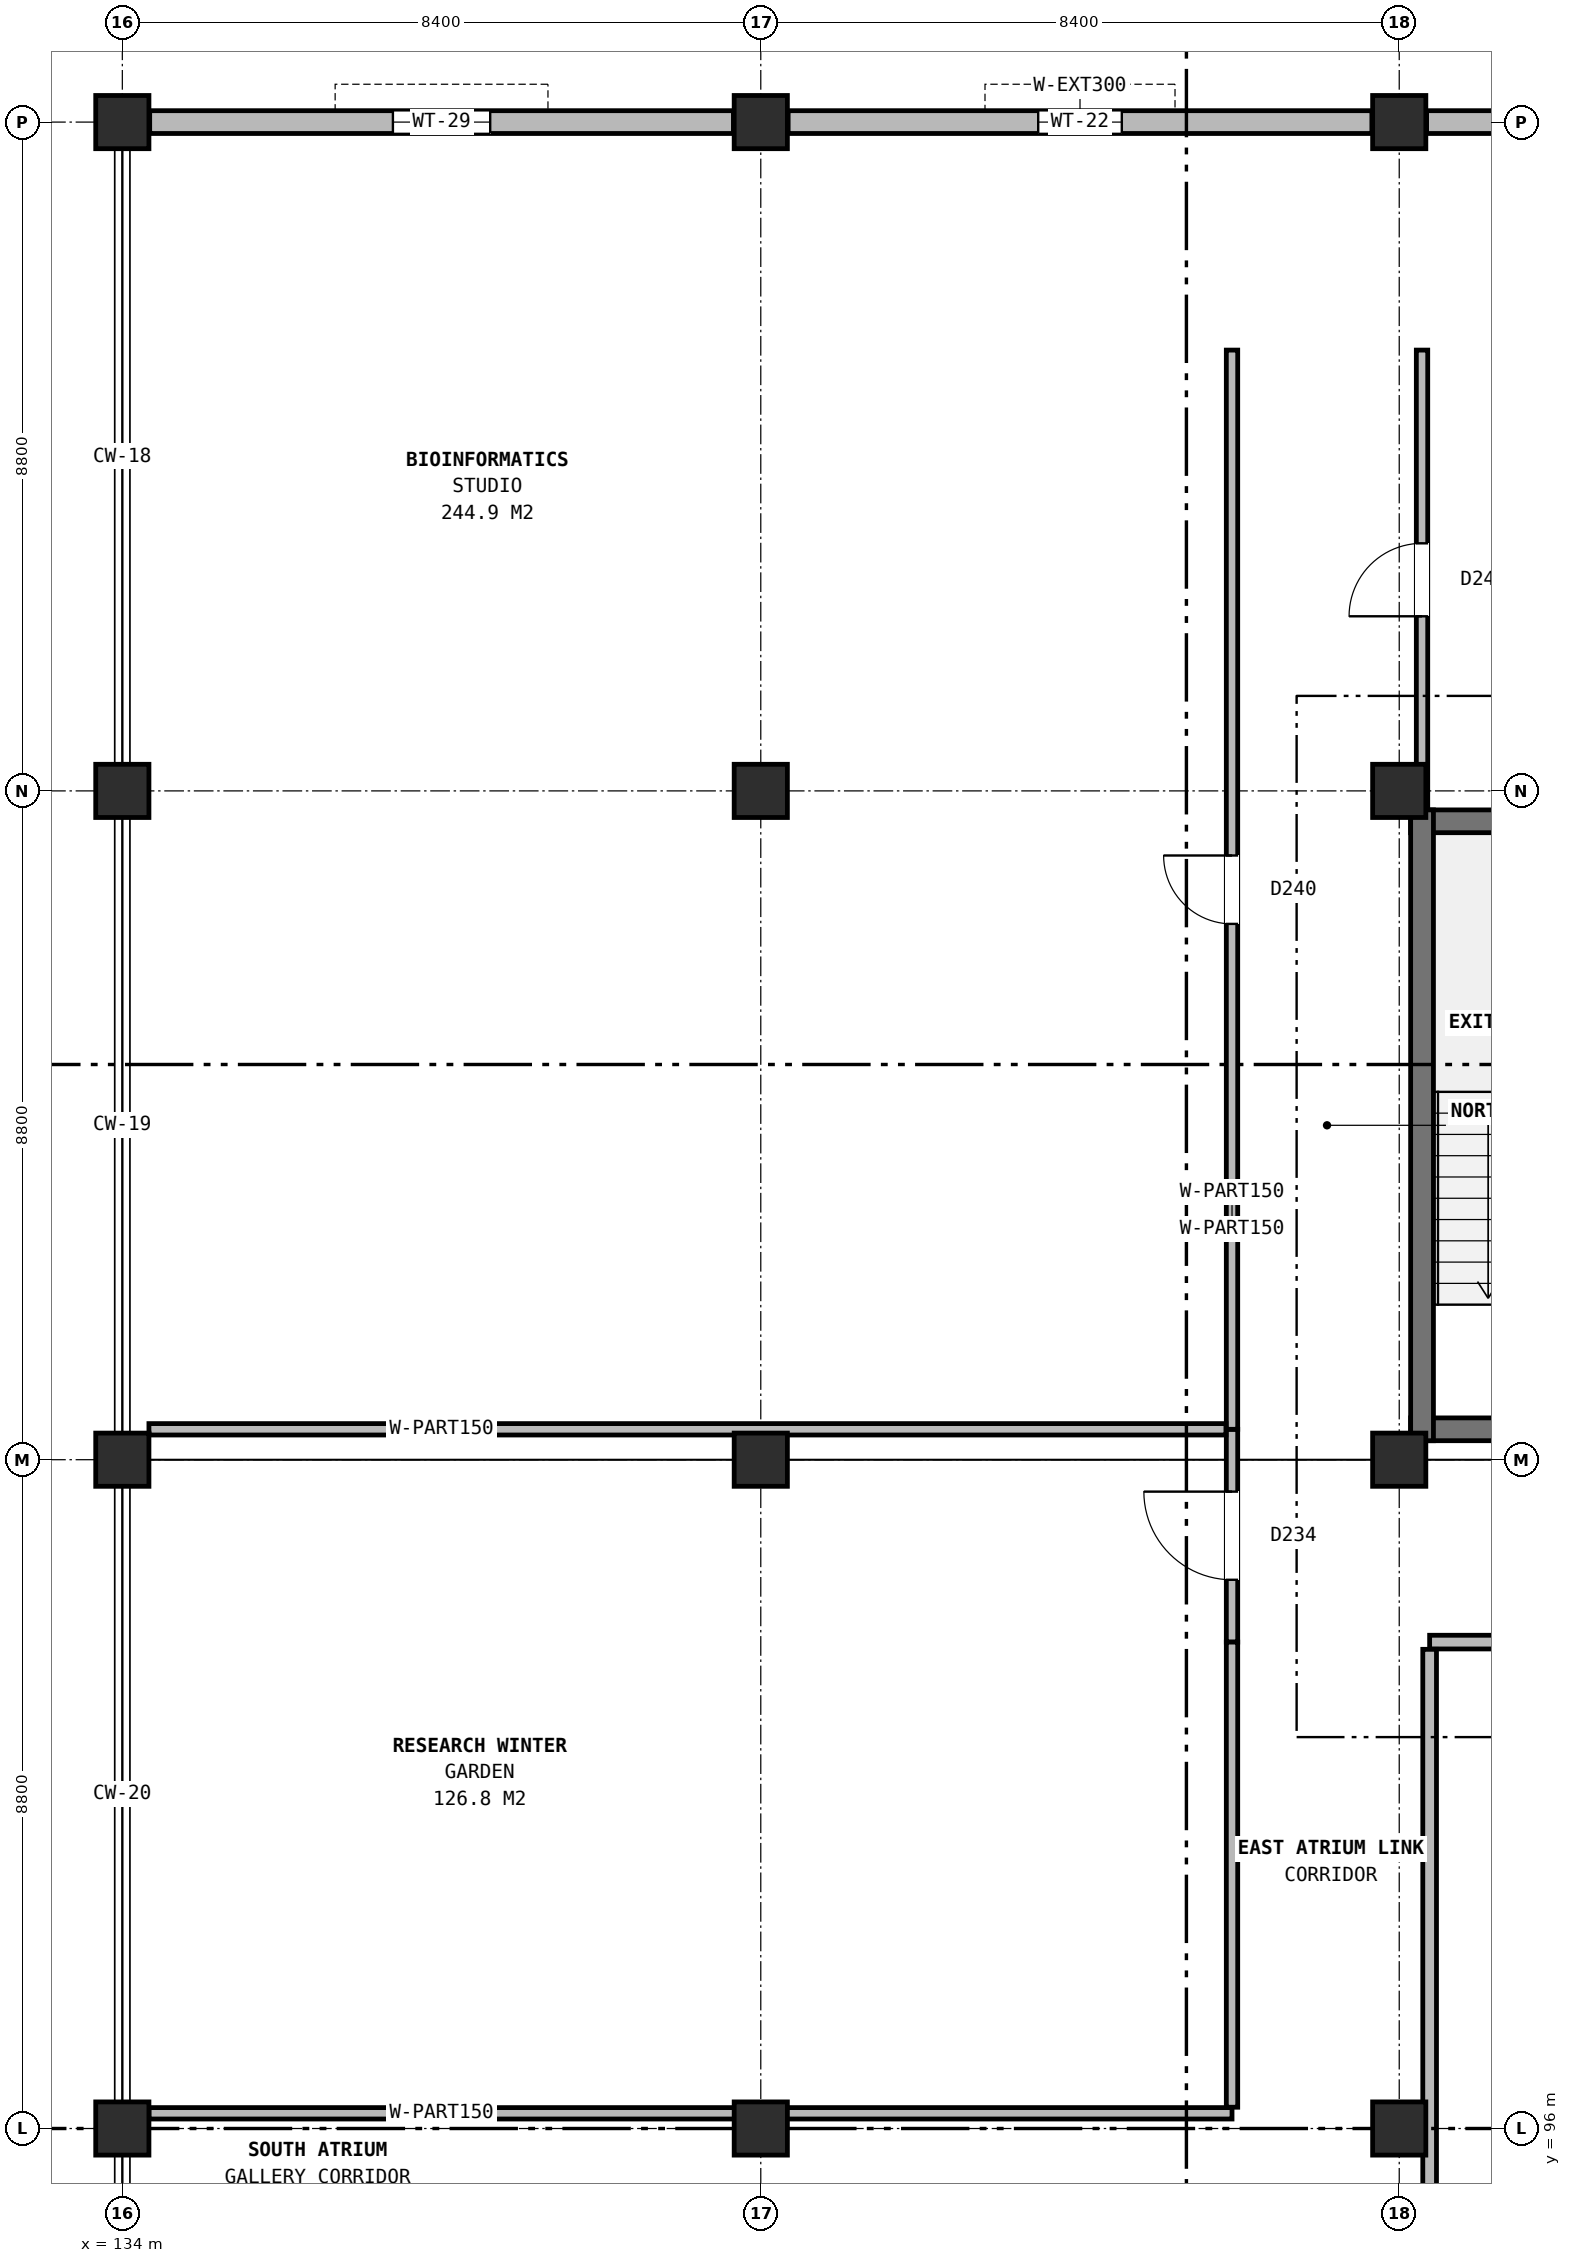
"""IFC4 building model, lengths in metres.
Left out: names, types, materials, properties, quantities, classifications, styles, units other than length and angle.
Written with IfcOpenShell. Run it as: python <this file> out.ifc"""

import sys

from ifc_helpers import new_model, si_unit, direction, frame, frame_2d, origin, origin_2d, place, context, subcontext, project, spatial, rectangle, extrude, element, fill, save


model = new_model("IFC4")
c1 = context("Model", 3, precision=1e-05, world=origin(), true_north=direction((0.0, 1.0)))
c2 = subcontext(c1, "Body", "Model", "MODEL_VIEW")
j1 = project(units=[si_unit("LENGTHUNIT", "METRE"), si_unit("PLANEANGLEUNIT", "RADIAN")], contexts=[c1])
p1 = place(None, origin())
s1 = spatial("IfcSite", under=j1, at=p1, CompositionType="ELEMENT")
p2 = place(p1, origin())
s2 = spatial("IfcBuilding", under=s1, at=p2, CompositionType="ELEMENT")
p3 = place(p2, frame((0.0, 0.0, 36.8)))
s3 = spatial("IfcBuildingStorey", under=s2, at=p3, CompositionType="ELEMENT", Elevation=36.8)
for number, where, z_axis, x_axis in (
    (1, (134.0, 96.0, 0.0), (0.0, 0.0, 1.0), (1.0, 0.0, 0.0)),
    (2, (134.0, 104.8, 0.0), (0.0, 0.0, 1.0), (1.0, 0.0, 0.0)),
    (3, (134.0, 113.6, 0.0), (0.0, 0.0, 1.0), (1.0, 0.0, 0.0)),
    (4, (134.0, 122.4, 0.0), (0.0, 0.0, 1.0), (1.0, 0.0, 0.0)),
    (5, (142.4, 96.0, 0.0), (0.0, 0.0, 1.0), (1.0, 0.0, 0.0)),
    (6, (142.4, 104.8, 0.0), (0.0, 0.0, 1.0), (1.0, 0.0, 0.0)),
    (7, (142.4, 113.6, 0.0), (0.0, 0.0, 1.0), (1.0, 0.0, 0.0)),
    (8, (142.4, 122.4, 0.0), (0.0, 0.0, 1.0), (1.0, 0.0, 0.0)),
    (9, (150.8, 96.0, 0.0), (0.0, 0.0, 1.0), (1.0, 0.0, 0.0)),
    (10, (150.8, 104.8, 0.0), (0.0, 0.0, 1.0), (1.0, 0.0, 0.0)),
    (11, (150.8, 113.6, 0.0), (0.0, 0.0, 1.0), (1.0, 0.0, 0.0)),
    (12, (150.8, 122.4, 0.0), (0.0, 0.0, 1.0), (1.0, 0.0, 0.0)),
):
    element("IfcColumn", number, at=place(p3, frame(where, z_axis=z_axis, x_axis=x_axis)), inside=s3, PredefinedType="COLUMN", context=c2, shape_type="SweptSolid", body=[
        extrude(rectangle(XDim=0.7, YDim=0.7, at=origin_2d()), origin(), (0.0, 0.0, 1.0), 3.8),
    ])
p4 = place(p3, frame((158.84, 122.4, 0.0), z_axis=(0.0, 0.0, 1.0), x_axis=(-1.0, 0.0, 0.0)))
e13 = element("IfcWall", 13, at=p4, inside=s3, PredefinedType="SOLIDWALL", context=c2, shape_type="SweptSolid", body=[
    extrude(rectangle(XDim=7.68, YDim=0.3, at=frame_2d((3.84, 0.0))), origin(), (0.0, 0.0, 1.0), 3.05),
])
p5 = place(p4, frame((3.365, 0.0, 0.9)))
e14 = element("IfcOpeningElement", 14, at=p5, cuts=e13, PredefinedType="OPENING", context=c2, shape_type="SweptSolid", body=[
    extrude(rectangle(XDim=0.95, YDim=1.6, at=frame_2d((0.475, 0.8))), frame((0.0, 0.16, 0.0), z_axis=(0.0, -1.0, 0.0), x_axis=(1.0, 0.0, 0.0)), (0.0, 0.0, 1.0), 0.32),
])
p6 = place(p3, frame((150.44, 122.4, 0.0), z_axis=(0.0, 0.0, 1.0), x_axis=(-1.0, 0.0, 0.0)))
e15 = element("IfcWall", 15, at=p6, inside=s3, PredefinedType="SOLIDWALL", context=c2, shape_type="SweptSolid", body=[
    extrude(rectangle(XDim=7.68, YDim=0.3, at=frame_2d((3.84, 0.0))), origin(), (0.0, 0.0, 1.0), 3.05),
])
p7 = place(p6, frame((3.29, 0.0, 0.9)))
e16 = element("IfcOpeningElement", 16, at=p7, cuts=e15, PredefinedType="OPENING", context=c2, shape_type="SweptSolid", body=[
    extrude(rectangle(XDim=1.1, YDim=1.65, at=frame_2d((0.55, 0.825))), frame((0.0, 0.16, 0.0), z_axis=(0.0, -1.0, 0.0), x_axis=(1.0, 0.0, 0.0)), (0.0, 0.0, 1.0), 0.32),
])
p8 = place(p3, frame((142.04, 122.4, 0.0), z_axis=(0.0, 0.0, 1.0), x_axis=(-1.0, 0.0, 0.0)))
e17 = element("IfcWall", 17, at=p8, inside=s3, PredefinedType="SOLIDWALL", context=c2, shape_type="SweptSolid", body=[
    extrude(rectangle(XDim=7.68, YDim=0.3, at=frame_2d((3.84, 0.0))), origin(), (0.0, 0.0, 1.0), 3.05),
])
p9 = place(p8, frame((3.2, 0.0, 0.9)))
e18 = element("IfcOpeningElement", 18, at=p9, cuts=e17, PredefinedType="OPENING", context=c2, shape_type="SweptSolid", body=[
    extrude(rectangle(XDim=1.28, YDim=1.82, at=frame_2d((0.64, 0.91))), frame((0.0, 0.16, 0.0), z_axis=(0.0, -1.0, 0.0), x_axis=(1.0, 0.0, 0.0)), (0.0, 0.0, 1.0), 0.32),
])
for number, where, z_axis, x_axis in (
    (19, (150.95, 105.2, 0.0), (0.0, 0.0, 1.0), (1.0, 0.0, 0.0)),
    (20, (150.95, 113.2, 0.0), (0.0, 0.0, 1.0), (1.0, 0.0, 0.0)),
):
    element("IfcWall", number, at=place(p3, frame(where, z_axis=z_axis, x_axis=x_axis)), inside=s3, PredefinedType="SHEAR", context=c2, shape_type="SweptSolid", body=[
        extrude(rectangle(XDim=3.6, YDim=0.3, at=frame_2d((1.8, 0.0))), origin(), (0.0, 0.0, 1.0), 3.8),
    ])
p10 = place(p3, frame((151.1, 105.05, 0.0), z_axis=(0.0, 0.0, 1.0), x_axis=(0.0, 1.0, 0.0)))
e21 = element("IfcWall", 21, at=p10, inside=s3, PredefinedType="SHEAR", context=c2, shape_type="SweptSolid", body=[
    extrude(rectangle(XDim=8.3, YDim=0.3, at=frame_2d((4.15, 0.0))), origin(), (0.0, 0.0, 1.0), 3.8),
])
p11 = place(p3, frame((148.6, 102.4, 0.0), z_axis=(0.0, 0.0, 1.0), x_axis=(0.0, 1.0, 0.0)))
e22 = element("IfcWall", 22, at=p11, inside=s3, PredefinedType="PARTITIONING", context=c2, shape_type="SweptSolid", body=[
    extrude(rectangle(XDim=2.8, YDim=0.15, at=frame_2d((1.4, 0.0))), origin(), (0.0, 0.0, 1.0), 3.465),
])
p12 = place(p11, frame((0.82, 0.0, 0.0)))
e23 = element("IfcOpeningElement", 23, at=p12, cuts=e22, PredefinedType="OPENING", context=c2, shape_type="SweptSolid", body=[
    extrude(rectangle(XDim=1.16, YDim=2.2, at=frame_2d((0.58, 1.1))), frame((0.0, 0.085, 0.0), z_axis=(0.0, -1.0, 0.0), x_axis=(1.0, 0.0, 0.0)), (0.0, 0.0, 1.0), 0.17),
])
p13 = place(p3, frame((151.2, 102.4, 0.0), z_axis=(0.0, 0.0, 1.0), x_axis=(1.0, 0.0, 0.0)))
e24 = element("IfcWall", 24, at=p13, inside=s3, PredefinedType="PARTITIONING", context=c2, shape_type="SweptSolid", body=[
    extrude(rectangle(XDim=24.8, YDim=0.18, at=frame_2d((12.4, 0.0))), origin(), (0.0, 0.0, 1.0), 3.465),
])
p14 = place(p13, frame((11.79, 0.0, 0.0)))
e25 = element("IfcOpeningElement", 25, at=p14, cuts=e24, PredefinedType="OPENING", context=c2, shape_type="SweptSolid", body=[
    extrude(rectangle(XDim=1.22, YDim=2.2, at=frame_2d((0.61, 1.1))), frame((0.0, 0.1, 0.0), z_axis=(0.0, -1.0, 0.0), x_axis=(1.0, 0.0, 0.0)), (0.0, 0.0, 1.0), 0.2),
])
p15 = place(p3, frame((134.35, 96.2, 0.0), z_axis=(0.0, 0.0, 1.0), x_axis=(1.0, 0.0, 0.0)))
e26 = element("IfcWall", 26, at=p15, inside=s3, PredefinedType="PARTITIONING", context=c2, shape_type="SweptSolid", body=[
    extrude(rectangle(XDim=14.25, YDim=0.15, at=frame_2d((7.125, 0.0))), origin(), (0.0, 0.0, 1.0), 3.045),
])
p16 = place(p3, frame((148.6, 96.28, 0.0), z_axis=(0.0, 0.0, 1.0), x_axis=(0.0, 1.0, 0.0)))
e27 = element("IfcWall", 27, at=p16, inside=s3, PredefinedType="PARTITIONING", context=c2, shape_type="SweptSolid", body=[
    extrude(rectangle(XDim=6.12, YDim=0.15, at=frame_2d((3.06, 0.0))), origin(), (0.0, 0.0, 1.0), 3.465),
])
p17 = place(p3, frame((151.2, 94.8, 0.0), z_axis=(0.0, 0.0, 1.0), x_axis=(0.0, 1.0, 0.0)))
e28 = element("IfcWall", 28, at=p17, inside=s3, PredefinedType="PARTITIONING", context=c2, shape_type="SweptSolid", body=[
    extrude(rectangle(XDim=7.505, YDim=0.18, at=frame_2d((3.752, 0.0))), origin(), (0.0, 0.0, 1.0), 3.045),
])
p18 = place(p3, frame((148.6, 105.2, 0.0), z_axis=(0.0, 0.0, 1.0), x_axis=(0.0, 1.0, 0.0)))
e29 = element("IfcWall", 29, at=p18, inside=s3, PredefinedType="PARTITIONING", context=c2, shape_type="SweptSolid", body=[
    extrude(rectangle(XDim=14.2, YDim=0.15, at=frame_2d((7.1, 0.0))), origin(), (0.0, 0.0, 1.0), 3.465),
])
p19 = place(p18, frame((6.65, 0.0, 0.0)))
e30 = element("IfcOpeningElement", 30, at=p19, cuts=e29, PredefinedType="OPENING", context=c2, shape_type="SweptSolid", body=[
    extrude(rectangle(XDim=0.9, YDim=2.12, at=frame_2d((0.45, 1.06))), frame((0.0, 0.085, 0.0), z_axis=(0.0, -1.0, 0.0), x_axis=(1.0, 0.0, 0.0)), (0.0, 0.0, 1.0), 0.17),
])
p20 = place(p3, frame((151.1, 113.355, 0.0), z_axis=(0.0, 0.0, 1.0), x_axis=(0.0, 1.0, 0.0)))
e31 = element("IfcWall", 31, at=p20, inside=s3, PredefinedType="PARTITIONING", context=c2, shape_type="SweptSolid", body=[
    extrude(rectangle(XDim=6.045, YDim=0.15, at=frame_2d((3.022, 0.0))), origin(), (0.0, 0.0, 1.0), 3.045),
])
p21 = place(p20, frame((2.542, 0.0, 0.0)))
e32 = element("IfcOpeningElement", 32, at=p21, cuts=e31, PredefinedType="OPENING", context=c2, shape_type="SweptSolid", body=[
    extrude(rectangle(XDim=0.96, YDim=2.14, at=frame_2d((0.48, 1.07))), frame((0.0, 0.085, 0.0), z_axis=(0.0, -1.0, 0.0), x_axis=(1.0, 0.0, 0.0)), (0.0, 0.0, 1.0), 0.17),
])
p22 = place(p3, frame((134.35, 105.2, 0.0), z_axis=(0.0, 0.0, 1.0), x_axis=(1.0, 0.0, 0.0)))
e33 = element("IfcWall", 33, at=p22, inside=s3, PredefinedType="PARTITIONING", context=c2, shape_type="SweptSolid", body=[
    extrude(rectangle(XDim=14.17, YDim=0.15, at=frame_2d((7.085, 0.0))), origin(), (0.0, 0.0, 1.0), 3.045),
])
p23 = place(p7, origin())
e34 = element("IfcWindow", 34, at=p23, inside=s3, PartitioningType="SINGLE_PANEL", PredefinedType="WINDOW", context=c2, shape_type="SweptSolid", body=[
    extrude(rectangle(XDim=1.1, YDim=1.65, at=frame_2d((0.55, 0.825))), frame((0.0, 0.03, 0.0), z_axis=(0.0, -1.0, 0.0), x_axis=(1.0, 0.0, 0.0)), (0.0, 0.0, 1.0), 0.06),
])
fill(e16, e34)
p24 = place(p9, origin())
e35 = element("IfcWindow", 35, at=p24, inside=s3, PartitioningType="SINGLE_PANEL", PredefinedType="WINDOW", context=c2, shape_type="SweptSolid", body=[
    extrude(rectangle(XDim=1.28, YDim=1.82, at=frame_2d((0.64, 0.91))), frame((0.0, 0.03, 0.0), z_axis=(0.0, -1.0, 0.0), x_axis=(1.0, 0.0, 0.0)), (0.0, 0.0, 1.0), 0.06),
])
fill(e18, e35)
p25 = place(p12, origin())
e36 = element("IfcDoor", 36, at=p25, inside=s3, OperationType="SINGLE_SWING_RIGHT", PredefinedType="DOOR", context=c2, shape_type="SweptSolid", body=[
    extrude(rectangle(XDim=1.16, YDim=2.2, at=frame_2d((0.58, 1.1))), frame((0.0, 0.025, 0.0), z_axis=(0.0, -1.0, 0.0), x_axis=(1.0, 0.0, 0.0)), (0.0, 0.0, 1.0), 0.05),
])
fill(e23, e36)
p26 = place(p19, origin())
e37 = element("IfcDoor", 37, at=p26, inside=s3, OperationType="SINGLE_SWING_RIGHT", PredefinedType="DOOR", context=c2, shape_type="SweptSolid", body=[
    extrude(rectangle(XDim=0.9, YDim=2.12, at=frame_2d((0.45, 1.06))), frame((0.0, 0.025, 0.0), z_axis=(0.0, -1.0, 0.0), x_axis=(1.0, 0.0, 0.0)), (0.0, 0.0, 1.0), 0.05),
])
fill(e30, e37)
p27 = place(p21, origin())
e38 = element("IfcDoor", 38, at=p27, inside=s3, OperationType="SINGLE_SWING_LEFT", PredefinedType="DOOR", context=c2, shape_type="SweptSolid", body=[
    extrude(rectangle(XDim=0.96, YDim=2.14, at=frame_2d((0.48, 1.07))), frame((0.0, 0.025, 0.0), z_axis=(0.0, -1.0, 0.0), x_axis=(1.0, 0.0, 0.0)), (0.0, 0.0, 1.0), 0.05),
])
fill(e32, e38)
save(model, sys.argv[1])
